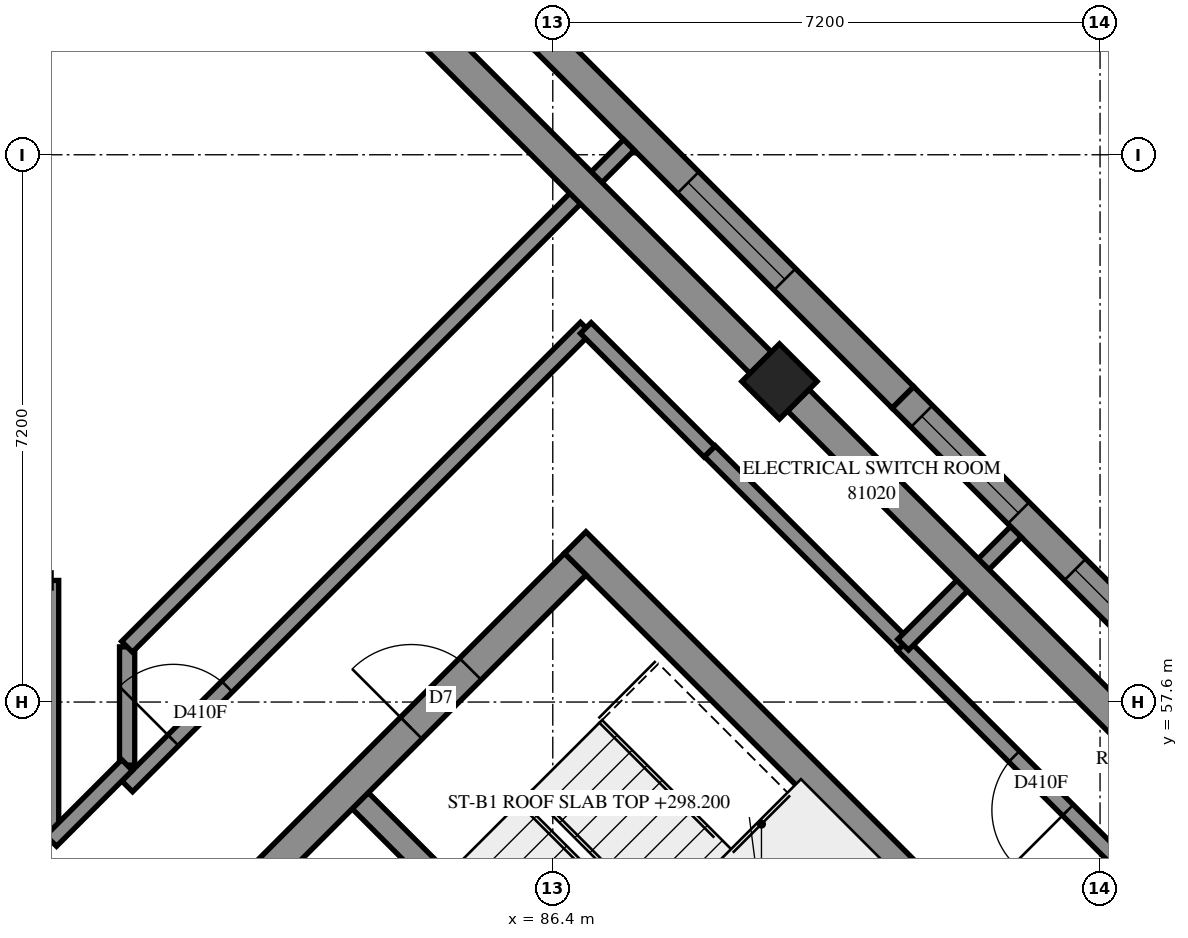
"""IFC4 building model, lengths in metres.
Left out: names, types, materials, properties, quantities, classifications, styles, units other than length and angle.
Written with IfcOpenShell. Run it as: python <this file> out.ifc"""

import sys

from ifc_helpers import new_model, si_unit, direction, frame, frame_2d, origin, origin_2d, place, context, subcontext, project, spatial, polyline, rectangle, outline, extrude, element, fill, save


model = new_model("IFC4")
c1 = context("Model", 3, precision=1e-05, world=origin(), true_north=direction((0.0, 1.0)))
c2 = subcontext(c1, "Body", "Model", "MODEL_VIEW")
j1 = project(units=[si_unit("LENGTHUNIT", "METRE"), si_unit("PLANEANGLEUNIT", "RADIAN")], contexts=[c1])
p1 = place(None, origin())
s1 = spatial("IfcSite", under=j1, at=p1, CompositionType="ELEMENT")
p2 = place(p1, origin())
s2 = spatial("IfcBuilding", under=s1, at=p2, CompositionType="ELEMENT")
p3 = place(p2, frame((0.0, 0.0, 298.2)))
s3 = spatial("IfcBuildingStorey", under=s2, at=p3, CompositionType="ELEMENT", Elevation=298.2)
p4 = place(p3, frame((89.382, 61.818, 0.0), z_axis=(0.0, 0.0, 1.0), x_axis=(0.7071067812, -0.7071067812, 0.0)))
e1 = element("IfcColumn", 1, at=p4, inside=s3, PredefinedType="COLUMN", context=c2, shape_type="SweptSolid", body=[
    extrude(rectangle(XDim=0.7, YDim=0.7, at=origin_2d()), origin(), (0.0, 0.0, 1.0), 3.5),
])
p5 = place(p3, frame((86.695, 59.696, -0.3), z_axis=(0.0, 0.0, 1.0), x_axis=(0.7071100706, -0.7071034917, 0.0)))
e2 = element("IfcWall", 2, at=p5, inside=s3, PredefinedType="SHEAR", context=c2, shape_type="SweptSolid", body=[
    extrude(outline(polyline([(0.0, 0.0), (15.2, 0.0), (15.2, 3.1), (0.0, 3.1), (0.0, 0.0)])), frame((0.0, 0.2, 0.0), z_axis=(0.0, -1.0, 0.0), x_axis=(1.0, 0.0, 0.0)), (0.0, 0.0, 1.0), 0.4),
])
p6 = place(p5, frame((10.4, 0.0, 0.3)))
e3 = element("IfcOpeningElement", 3, at=p6, cuts=e2, PredefinedType="OPENING", context=c2, shape_type="SweptSolid", body=[
    extrude(rectangle(XDim=0.8, YDim=2.1, at=frame_2d((0.4, 1.05))), frame((0.0, 0.21, 0.0), z_axis=(0.0, -1.0, 0.0), x_axis=(1.0, 0.0, 0.0)), (0.0, 0.0, 1.0), 0.42),
])
p7 = place(p3, frame((76.513, 49.231, -0.3), z_axis=(0.0, 0.0, 1.0), x_axis=(0.7071067812, 0.7071067812, 0.0)))
e4 = element("IfcWall", 4, at=p7, inside=s3, PredefinedType="SHEAR", context=c2, shape_type="SweptSolid", body=[
    extrude(outline(polyline([(0.0, 0.0), (14.4, 0.0), (14.4, 3.1), (0.0, 3.1), (0.0, 0.0)])), frame((0.0, 0.2, 0.0), z_axis=(0.0, -1.0, 0.0), x_axis=(1.0, 0.0, 0.0)), (0.0, 0.0, 1.0), 0.4),
])
p8 = place(p7, frame((4.55, 0.0, 0.3)))
e5 = element("IfcOpeningElement", 5, at=p8, cuts=e4, PredefinedType="OPENING", context=c2, shape_type="SweptSolid", body=[
    extrude(rectangle(XDim=1.1, YDim=2.1, at=frame_2d((0.55, 1.05))), frame((0.0, 0.21, 0.0), z_axis=(0.0, -1.0, 0.0), x_axis=(1.0, 0.0, 0.0)), (0.0, 0.0, 1.0), 0.42),
])
p9 = place(p7, frame((11.35, 0.0, 0.3)))
e6 = element("IfcOpeningElement", 6, at=p9, cuts=e4, PredefinedType="OPENING", context=c2, shape_type="SweptSolid", body=[
    extrude(rectangle(XDim=1.1, YDim=2.1, at=frame_2d((0.55, 1.05))), frame((0.0, 0.21, 0.0), z_axis=(0.0, -1.0, 0.0), x_axis=(1.0, 0.0, 0.0)), (0.0, 0.0, 1.0), 0.42),
])
p10 = place(p3, frame((83.867, 56.302, 0.0), z_axis=(0.0, 0.0, 1.0), x_axis=(0.7071137256, -0.7070998367, 0.0)))
e7 = element("IfcWall", 7, at=p10, inside=s3, PredefinedType="SOLIDWALL", context=c2, shape_type="SweptSolid", body=[
    extrude(outline(polyline([(0.0, 0.0), (7.2, 0.0), (7.2, 3.5), (0.0, 3.5), (0.0, 0.0)])), frame((0.0, 0.15, 0.0), z_axis=(0.0, -1.0, 0.0), x_axis=(1.0, 0.0, 0.0)), (0.0, 0.0, 1.0), 0.3),
])
p11 = place(p3, frame((95.73, 56.884, 0.0), z_axis=(0.0, 0.0, 1.0), x_axis=(-0.7071067812, 0.7071067812, 0.0)))
e8 = element("IfcWall", 8, at=p11, inside=s3, PredefinedType="SOLIDWALL", context=c2, shape_type="SweptSolid", body=[
    extrude(outline(polyline([(0.0, -0.2), (6.682, -0.2), (6.682, 0.2), (0.0, 0.2), (0.0, -0.2)])), origin(), (0.0, 0.0, 1.0), 3.5),
])
p12 = place(p11, frame((1.677, 0.0, 0.7)))
e9 = element("IfcOpeningElement", 9, at=p12, cuts=e8, PredefinedType="OPENING", context=c2, shape_type="SweptSolid", body=[
    extrude(rectangle(XDim=1.8, YDim=2.2, at=frame_2d((0.9, 1.1))), frame((0.0, 0.21, 0.0), z_axis=(0.0, -1.0, 0.0), x_axis=(1.0, 0.0, 0.0)), (0.0, 0.0, 1.0), 0.42),
])
p13 = place(p11, frame((4.529, 0.0, 0.7)))
e10 = element("IfcOpeningElement", 10, at=p13, cuts=e8, PredefinedType="OPENING", context=c2, shape_type="SweptSolid", body=[
    extrude(rectangle(XDim=1.8, YDim=2.2, at=frame_2d((0.9, 1.1))), frame((0.0, 0.21, 0.0), z_axis=(0.0, -1.0, 0.0), x_axis=(1.0, 0.0, 0.0)), (0.0, 0.0, 1.0), 0.42),
])
p14 = place(p3, frame((91.005, 61.609, 0.0), z_axis=(0.0, 0.0, 1.0), x_axis=(-0.7071142638, 0.7070992985, 0.0)))
e11 = element("IfcWall", 11, at=p14, inside=s3, PredefinedType="SOLIDWALL", context=c2, shape_type="SweptSolid", body=[
    extrude(outline(polyline([(0.0, -0.2), (6.682, -0.2), (6.682, 0.2), (0.0, 0.2), (0.0, -0.2)])), origin(), (0.0, 0.0, 1.0), 3.5),
])
p15 = place(p14, frame((2.195, 0.0, 0.7)))
e12 = element("IfcOpeningElement", 12, at=p15, cuts=e11, PredefinedType="OPENING", context=c2, shape_type="SweptSolid", body=[
    extrude(rectangle(XDim=1.8, YDim=2.2, at=frame_2d((0.9, 1.1))), frame((0.0, 0.21, 0.0), z_axis=(0.0, -1.0, 0.0), x_axis=(1.0, 0.0, 0.0)), (0.0, 0.0, 1.0), 0.42),
])
p16 = place(p3, frame((100.269, 49.087, 0.0), z_axis=(0.0, 0.0, 1.0), x_axis=(-0.7071525817, 0.7070609777, 0.0)))
e13 = element("IfcWall", 13, at=p16, inside=s3, PredefinedType="PARTITIONING", context=c2, shape_type="SweptSolid", body=[
    extrude(rectangle(XDim=13.1, YDim=0.2, at=frame_2d((6.55, 0.0))), origin(), (0.0, 0.0, 1.0), 3.5),
])
p17 = place(p16, frame((10.029, 0.0, 0.0)))
e14 = element("IfcOpeningElement", 14, at=p17, cuts=e13, PredefinedType="OPENING", context=c2, shape_type="SweptSolid", body=[
    extrude(rectangle(XDim=1.0, YDim=2.1, at=frame_2d((0.5, 1.05))), frame((0.0, 0.11, 0.0), z_axis=(0.0, -1.0, 0.0), x_axis=(1.0, 0.0, 0.0)), (0.0, 0.0, 1.0), 0.22),
])
p18 = place(p3, frame((80.801, 56.491, 0.0), z_axis=(0.0, 0.0, 1.0), x_axis=(0.7071067812, 0.7071067812, 0.0)))
e15 = element("IfcWall", 15, at=p18, inside=s3, PredefinedType="PARTITIONING", context=c2, shape_type="SweptSolid", body=[
    extrude(rectangle(XDim=8.533, YDim=0.2, at=frame_2d((4.267, 0.0))), origin(), (0.0, 0.0, 1.0), 3.5),
])
p19 = place(p18, frame((0.856, 0.0, 0.0)))
e16 = element("IfcOpeningElement", 16, at=p19, cuts=e15, PredefinedType="OPENING", context=c2, shape_type="SweptSolid", body=[
    extrude(rectangle(XDim=1.0, YDim=2.1, at=frame_2d((0.5, 1.05))), frame((0.0, 0.11, 0.0), z_axis=(0.0, -1.0, 0.0), x_axis=(1.0, 0.0, 0.0)), (0.0, 0.0, 1.0), 0.22),
])
p20 = place(p3, frame((88.466, 60.9, 0.0), z_axis=(0.0, 0.0, 1.0), x_axis=(0.7073845681, -0.7068288851, 0.0)))
e17 = element("IfcWall", 17, at=p20, inside=s3, PredefinedType="PARTITIONING", context=c2, shape_type="SweptSolid", body=[
    extrude(rectangle(XDim=3.599, YDim=0.2, at=frame_2d((1.8, 0.0))), origin(), (0.0, 0.0, 1.0), 3.5),
])
p21 = place(p3, frame((79.8, 55.774, 0.0), z_axis=(0.0, 0.0, 1.0), x_axis=(0.0, 1.0, 0.0)))
e18 = element("IfcWall", 18, at=p21, inside=s3, PredefinedType="PARTITIONING", context=c2, shape_type="SweptSolid", body=[
    extrude(rectangle(XDim=3.426, YDim=0.2, at=frame_2d((1.713, 0.0))), origin(), (0.0, 0.0, 1.0), 3.5),
])
p22 = place(p3, frame((86.835, 62.52, 0.0), z_axis=(0.0, 0.0, 1.0), x_axis=(0.7071067812, -0.7071067812, 0.0)))
e19 = element("IfcWall", 19, at=p22, inside=s3, PredefinedType="PARTITIONING", context=c2, shape_type="SweptSolid", body=[
    extrude(rectangle(XDim=2.3, YDim=0.2, at=frame_2d((1.15, 0.0))), origin(), (0.0, 0.0, 1.0), 3.5),
])
p23 = place(p3, frame((80.8, 56.77, 0.0), z_axis=(0.0, 0.0, 1.0), x_axis=(0.0, 1.0, 0.0)))
e20 = element("IfcWall", 20, at=p23, inside=s3, PredefinedType="PARTITIONING", context=c2, shape_type="SweptSolid", body=[
    extrude(rectangle(XDim=1.556, YDim=0.2, at=frame_2d((0.778, 0.0))), origin(), (0.0, 0.0, 1.0), 3.5),
])
p24 = place(p3, frame((79.801, 55.773, 0.0), z_axis=(0.0, 0.0, 1.0), x_axis=(0.7071067812, 0.7071067812, 0.0)))
e21 = element("IfcWall", 21, at=p24, inside=s3, PredefinedType="PARTITIONING", context=c2, shape_type="SweptSolid", body=[
    extrude(rectangle(XDim=1.411, YDim=0.2, at=frame_2d((0.706, 0.0))), origin(), (0.0, 0.0, 1.0), 3.5),
])
p25 = place(p3, frame((80.799, 58.327, 0.0), z_axis=(0.0, 0.0, 1.0), x_axis=(0.7071067812, 0.7071067812, 0.0)))
e22 = element("IfcWall", 22, at=p25, inside=s3, PredefinedType="PARTITIONING", context=c2, shape_type="SweptSolid", body=[
    extrude(outline(polyline([(0.0, -0.1), (9.338, -0.1), (9.338, 0.1), (0.0, 0.1), (0.0, -0.1)])), origin(), (0.0, 0.0, 1.0), 3.5),
])
p26 = place(p3, frame((91.009, 58.355, 0.0), z_axis=(0.0, 0.0, 1.0), x_axis=(0.7071067812, 0.7071067812, 0.0)))
e23 = element("IfcWall", 23, at=p26, inside=s3, PredefinedType="PARTITIONING", context=c2, shape_type="SweptSolid", body=[
    extrude(outline(polyline([(0.0, -0.1), (2.098, -0.1), (2.098, 0.1), (0.0, 0.1), (0.0, -0.1)])), origin(), (0.0, 0.0, 1.0), 3.5),
])
p27 = place(p12, origin())
e24 = element("IfcWindow", 24, at=p27, inside=s3, PartitioningType="SINGLE_PANEL", PredefinedType="WINDOW", context=c2, shape_type="SweptSolid", body=[
    extrude(rectangle(XDim=1.8, YDim=2.2, at=frame_2d((0.9, 1.1))), frame((0.0, 0.08, 0.0), z_axis=(0.0, -1.0, 0.0), x_axis=(1.0, 0.0, 0.0)), (0.0, 0.0, 1.0), 0.06),
])
fill(e9, e24)
p28 = place(p13, origin())
e25 = element("IfcWindow", 25, at=p28, inside=s3, PartitioningType="SINGLE_PANEL", PredefinedType="WINDOW", context=c2, shape_type="SweptSolid", body=[
    extrude(rectangle(XDim=1.8, YDim=2.2, at=frame_2d((0.9, 1.1))), frame((0.0, 0.08, 0.0), z_axis=(0.0, -1.0, 0.0), x_axis=(1.0, 0.0, 0.0)), (0.0, 0.0, 1.0), 0.06),
])
fill(e10, e25)
p29 = place(p15, origin())
e26 = element("IfcWindow", 26, at=p29, inside=s3, PartitioningType="SINGLE_PANEL", PredefinedType="WINDOW", context=c2, shape_type="SweptSolid", body=[
    extrude(rectangle(XDim=1.8, YDim=2.2, at=frame_2d((0.9, 1.1))), frame((0.0, 0.08, 0.0), z_axis=(0.0, -1.0, 0.0), x_axis=(1.0, 0.0, 0.0)), (0.0, 0.0, 1.0), 0.06),
])
fill(e12, e26)
p30 = place(p9, origin())
e27 = element("IfcDoor", 27, at=p30, inside=s3, OperationType="SINGLE_SWING_LEFT", PredefinedType="DOOR", context=c2, shape_type="SweptSolid", body=[
    extrude(rectangle(XDim=1.1, YDim=2.1, at=frame_2d((0.55, 1.05))), frame((0.0, 0.025, 0.0), z_axis=(0.0, -1.0, 0.0), x_axis=(1.0, 0.0, 0.0)), (0.0, 0.0, 1.0), 0.05),
])
fill(e6, e27)
p31 = place(p19, origin())
e28 = element("IfcDoor", 28, at=p31, inside=s3, OperationType="SINGLE_SWING_RIGHT", PredefinedType="DOOR", context=c2, shape_type="SweptSolid", body=[
    extrude(rectangle(XDim=1.0, YDim=2.1, at=frame_2d((0.5, 1.05))), frame((0.0, 0.025, 0.0), z_axis=(0.0, -1.0, 0.0), x_axis=(1.0, 0.0, 0.0)), (0.0, 0.0, 1.0), 0.05),
])
fill(e16, e28)
p32 = place(p17, origin())
e29 = element("IfcDoor", 29, at=p32, inside=s3, OperationType="SINGLE_SWING_RIGHT", PredefinedType="DOOR", context=c2, shape_type="SweptSolid", body=[
    extrude(rectangle(XDim=1.0, YDim=2.1, at=frame_2d((0.5, 1.05))), frame((0.0, 0.025, 0.0), z_axis=(0.0, -1.0, 0.0), x_axis=(1.0, 0.0, 0.0)), (0.0, 0.0, 1.0), 0.05),
])
fill(e14, e29)
save(model, sys.argv[1])
